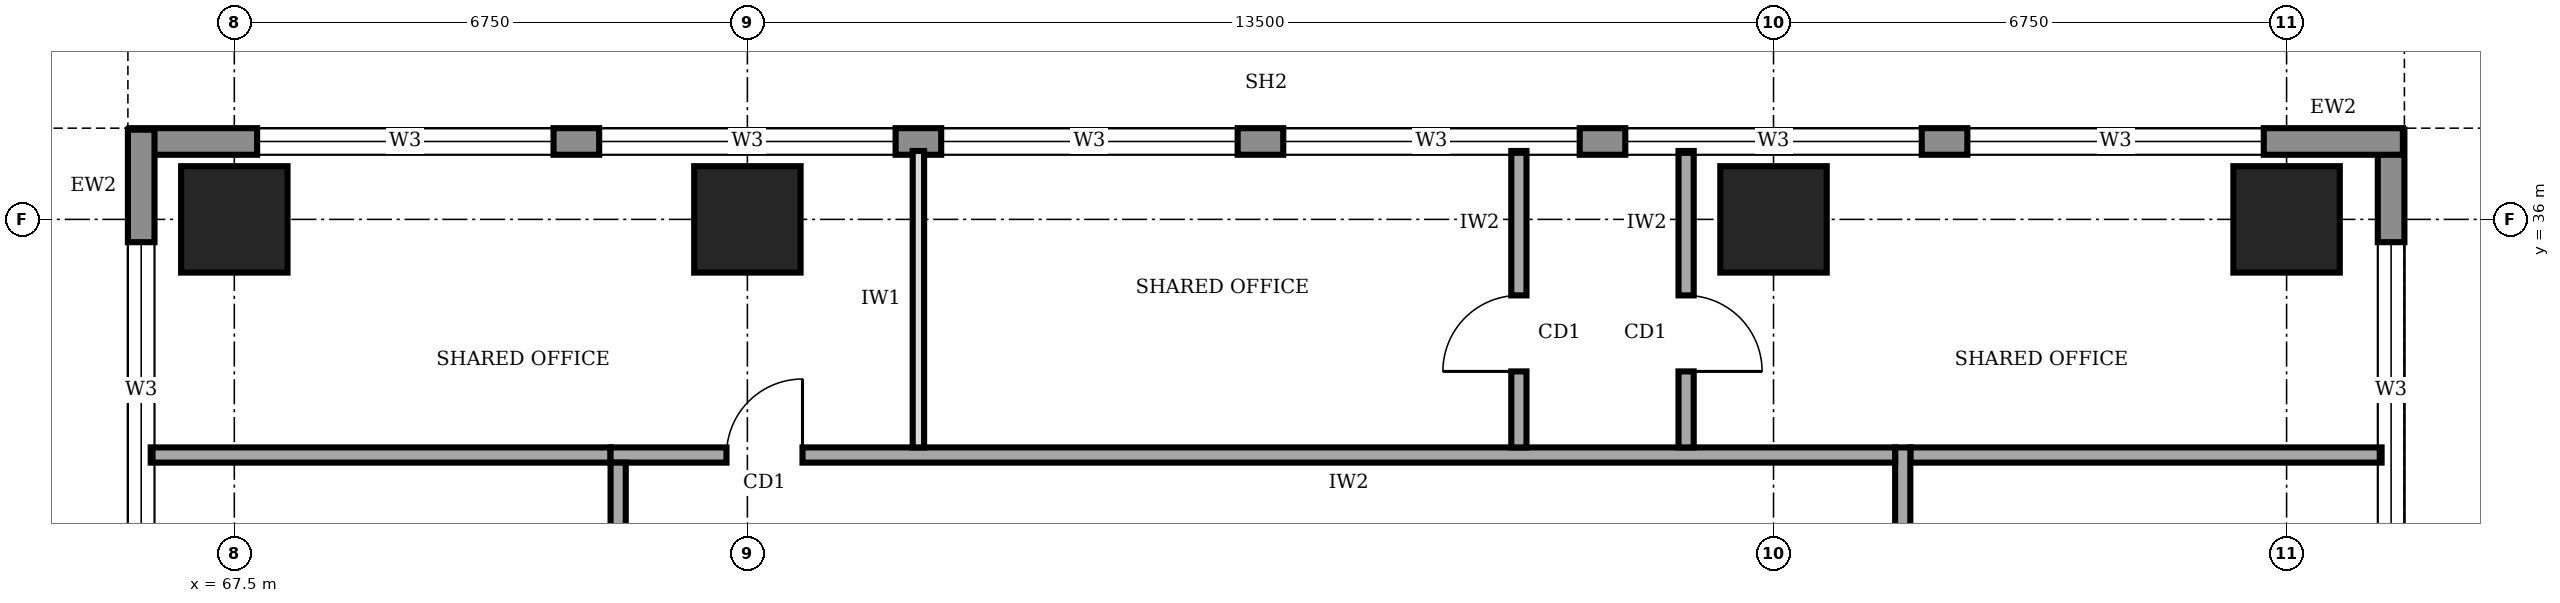
"""IFC4 building model, lengths in metres.
Left out: names, types, materials, properties, quantities, classifications, styles, units other than length and angle.
Written with IfcOpenShell. Run it as: python <this file> out.ifc"""

import sys

from ifc_helpers import new_model, si_unit, direction, frame, frame_2d, origin, origin_2d, place, context, subcontext, project, spatial, rectangle, extrude, element, fill, save


model = new_model("IFC4")
c1 = context("Model", 3, precision=1e-05, world=origin(), true_north=direction((0.0, 1.0)))
c2 = subcontext(c1, "Body", "Model", "MODEL_VIEW")
j1 = project(units=[si_unit("LENGTHUNIT", "METRE"), si_unit("PLANEANGLEUNIT", "RADIAN")], contexts=[c1])
p1 = place(None, origin())
s1 = spatial("IfcSite", under=j1, at=p1, CompositionType="ELEMENT")
p2 = place(p1, origin())
s2 = spatial("IfcBuilding", under=s1, at=p2, CompositionType="ELEMENT")
p3 = place(p2, frame((0.0, 0.0, 193.0)))
s3 = spatial("IfcBuildingStorey", under=s2, at=p3, CompositionType="ELEMENT", Elevation=193.0)
for number, where, z_axis, x_axis in (
    (1, (67.5, 36.0, 0.0), (0.0, 0.0, 1.0), (1.0, 0.0, 0.0)),
    (2, (74.25, 36.0, 0.0), (0.0, 0.0, 1.0), (1.0, 0.0, 0.0)),
    (3, (87.75, 36.0, 0.0), (0.0, 0.0, 1.0), (1.0, 0.0, 0.0)),
    (4, (94.5, 36.0, 0.0), (0.0, 0.0, 1.0), (1.0, 0.0, 0.0)),
):
    element("IfcColumn", number, at=place(p3, frame(where, z_axis=z_axis, x_axis=x_axis)), inside=s3, PredefinedType="COLUMN", context=c2, shape_type="SweptSolid", body=[
        extrude(rectangle(XDim=1.4, YDim=1.4, at=origin_2d()), origin(), (0.0, 0.0, 1.0), 4.0),
    ])
p4 = place(p3, frame((95.875, 3.32, 0.0), z_axis=(0.0, 0.0, 1.0), x_axis=(0.0, 1.0, 0.0)))
e5 = element("IfcWall", 5, at=p4, inside=s3, PredefinedType="STANDARD", context=c2, shape_type="SweptSolid", body=[
    extrude(rectangle(XDim=33.86, YDim=0.35, at=frame_2d((16.93, 0.0))), origin(), (0.0, 0.0, 1.0), 3.75),
])
p5 = place(p4, frame((1.48, 0.0, 0.95)))
e6 = element("IfcOpeningElement", 6, at=p5, cuts=e5, PredefinedType="OPENING", context=c2, shape_type="SweptSolid", body=[
    extrude(rectangle(XDim=3.9, YDim=1.8, at=frame_2d((1.95, 0.9))), frame((0.0, 0.185, 0.0), z_axis=(0.0, -1.0, 0.0), x_axis=(1.0, 0.0, 0.0)), (0.0, 0.0, 1.0), 0.37),
])
p6 = place(p4, frame((5.98, 0.0, 0.95)))
e7 = element("IfcOpeningElement", 7, at=p6, cuts=e5, PredefinedType="OPENING", context=c2, shape_type="SweptSolid", body=[
    extrude(rectangle(XDim=3.9, YDim=1.8, at=frame_2d((1.95, 0.9))), frame((0.0, 0.185, 0.0), z_axis=(0.0, -1.0, 0.0), x_axis=(1.0, 0.0, 0.0)), (0.0, 0.0, 1.0), 0.37),
])
p7 = place(p4, frame((10.48, 0.0, 0.95)))
e8 = element("IfcOpeningElement", 8, at=p7, cuts=e5, PredefinedType="OPENING", context=c2, shape_type="SweptSolid", body=[
    extrude(rectangle(XDim=3.9, YDim=1.8, at=frame_2d((1.95, 0.9))), frame((0.0, 0.185, 0.0), z_axis=(0.0, -1.0, 0.0), x_axis=(1.0, 0.0, 0.0)), (0.0, 0.0, 1.0), 0.37),
])
p8 = place(p4, frame((14.98, 0.0, 0.95)))
e9 = element("IfcOpeningElement", 9, at=p8, cuts=e5, PredefinedType="OPENING", context=c2, shape_type="SweptSolid", body=[
    extrude(rectangle(XDim=3.9, YDim=1.8, at=frame_2d((1.95, 0.9))), frame((0.0, 0.185, 0.0), z_axis=(0.0, -1.0, 0.0), x_axis=(1.0, 0.0, 0.0)), (0.0, 0.0, 1.0), 0.37),
])
p9 = place(p4, frame((19.48, 0.0, 0.95)))
e10 = element("IfcOpeningElement", 10, at=p9, cuts=e5, PredefinedType="OPENING", context=c2, shape_type="SweptSolid", body=[
    extrude(rectangle(XDim=3.9, YDim=1.8, at=frame_2d((1.95, 0.9))), frame((0.0, 0.185, 0.0), z_axis=(0.0, -1.0, 0.0), x_axis=(1.0, 0.0, 0.0)), (0.0, 0.0, 1.0), 0.37),
])
p10 = place(p4, frame((23.98, 0.0, 0.95)))
e11 = element("IfcOpeningElement", 11, at=p10, cuts=e5, PredefinedType="OPENING", context=c2, shape_type="SweptSolid", body=[
    extrude(rectangle(XDim=3.9, YDim=1.8, at=frame_2d((1.95, 0.9))), frame((0.0, 0.185, 0.0), z_axis=(0.0, -1.0, 0.0), x_axis=(1.0, 0.0, 0.0)), (0.0, 0.0, 1.0), 0.37),
])
p11 = place(p4, frame((28.48, 0.0, 0.95)))
e12 = element("IfcOpeningElement", 12, at=p11, cuts=e5, PredefinedType="OPENING", context=c2, shape_type="SweptSolid", body=[
    extrude(rectangle(XDim=3.9, YDim=1.8, at=frame_2d((1.95, 0.9))), frame((0.0, 0.185, 0.0), z_axis=(0.0, -1.0, 0.0), x_axis=(1.0, 0.0, 0.0)), (0.0, 0.0, 1.0), 0.37),
])
p12 = place(p3, frame((96.03, 37.025, 0.0), z_axis=(0.0, 0.0, 1.0), x_axis=(-1.0, 0.0, 0.0)))
e13 = element("IfcWall", 13, at=p12, inside=s3, PredefinedType="STANDARD", context=c2, shape_type="SweptSolid", body=[
    extrude(rectangle(XDim=29.91, YDim=0.35, at=frame_2d((14.955, 0.0))), origin(), (0.0, 0.0, 1.0), 3.75),
])
p13 = place(p12, frame((24.33, 0.0, 0.95)))
e14 = element("IfcOpeningElement", 14, at=p13, cuts=e13, PredefinedType="OPENING", context=c2, shape_type="SweptSolid", body=[
    extrude(rectangle(XDim=3.9, YDim=1.8, at=frame_2d((1.95, 0.9))), frame((0.0, 0.185, 0.0), z_axis=(0.0, -1.0, 0.0), x_axis=(1.0, 0.0, 0.0)), (0.0, 0.0, 1.0), 0.37),
])
p14 = place(p12, frame((19.83, 0.0, 0.95)))
e15 = element("IfcOpeningElement", 15, at=p14, cuts=e13, PredefinedType="OPENING", context=c2, shape_type="SweptSolid", body=[
    extrude(rectangle(XDim=3.9, YDim=1.8, at=frame_2d((1.95, 0.9))), frame((0.0, 0.185, 0.0), z_axis=(0.0, -1.0, 0.0), x_axis=(1.0, 0.0, 0.0)), (0.0, 0.0, 1.0), 0.37),
])
p15 = place(p12, frame((15.33, 0.0, 0.95)))
e16 = element("IfcOpeningElement", 16, at=p15, cuts=e13, PredefinedType="OPENING", context=c2, shape_type="SweptSolid", body=[
    extrude(rectangle(XDim=3.9, YDim=1.8, at=frame_2d((1.95, 0.9))), frame((0.0, 0.185, 0.0), z_axis=(0.0, -1.0, 0.0), x_axis=(1.0, 0.0, 0.0)), (0.0, 0.0, 1.0), 0.37),
])
p16 = place(p12, frame((10.83, 0.0, 0.95)))
e17 = element("IfcOpeningElement", 17, at=p16, cuts=e13, PredefinedType="OPENING", context=c2, shape_type="SweptSolid", body=[
    extrude(rectangle(XDim=3.9, YDim=1.8, at=frame_2d((1.95, 0.9))), frame((0.0, 0.185, 0.0), z_axis=(0.0, -1.0, 0.0), x_axis=(1.0, 0.0, 0.0)), (0.0, 0.0, 1.0), 0.37),
])
p17 = place(p12, frame((6.33, 0.0, 0.95)))
e18 = element("IfcOpeningElement", 18, at=p17, cuts=e13, PredefinedType="OPENING", context=c2, shape_type="SweptSolid", body=[
    extrude(rectangle(XDim=3.9, YDim=1.8, at=frame_2d((1.95, 0.9))), frame((0.0, 0.185, 0.0), z_axis=(0.0, -1.0, 0.0), x_axis=(1.0, 0.0, 0.0)), (0.0, 0.0, 1.0), 0.37),
])
p18 = place(p12, frame((1.83, 0.0, 0.95)))
e19 = element("IfcOpeningElement", 19, at=p18, cuts=e13, PredefinedType="OPENING", context=c2, shape_type="SweptSolid", body=[
    extrude(rectangle(XDim=3.9, YDim=1.8, at=frame_2d((1.95, 0.9))), frame((0.0, 0.185, 0.0), z_axis=(0.0, -1.0, 0.0), x_axis=(1.0, 0.0, 0.0)), (0.0, 0.0, 1.0), 0.37),
])
p19 = place(p3, frame((66.275, 37.18, 0.0), z_axis=(0.0, 0.0, 1.0), x_axis=(0.0, -1.0, 0.0)))
e20 = element("IfcWall", 20, at=p19, inside=s3, PredefinedType="STANDARD", context=c2, shape_type="SweptSolid", body=[
    extrude(rectangle(XDim=33.86, YDim=0.35, at=frame_2d((16.93, 0.0))), origin(), (0.0, 0.0, 1.0), 3.75),
])
p20 = place(p19, frame((28.48, 0.0, 0.95)))
e21 = element("IfcOpeningElement", 21, at=p20, cuts=e20, PredefinedType="OPENING", context=c2, shape_type="SweptSolid", body=[
    extrude(rectangle(XDim=3.9, YDim=1.8, at=frame_2d((1.95, 0.9))), frame((0.0, 0.185, 0.0), z_axis=(0.0, -1.0, 0.0), x_axis=(1.0, 0.0, 0.0)), (0.0, 0.0, 1.0), 0.37),
])
p21 = place(p19, frame((23.98, 0.0, 0.95)))
e22 = element("IfcOpeningElement", 22, at=p21, cuts=e20, PredefinedType="OPENING", context=c2, shape_type="SweptSolid", body=[
    extrude(rectangle(XDim=3.9, YDim=1.8, at=frame_2d((1.95, 0.9))), frame((0.0, 0.185, 0.0), z_axis=(0.0, -1.0, 0.0), x_axis=(1.0, 0.0, 0.0)), (0.0, 0.0, 1.0), 0.37),
])
p22 = place(p19, frame((19.48, 0.0, 0.95)))
e23 = element("IfcOpeningElement", 23, at=p22, cuts=e20, PredefinedType="OPENING", context=c2, shape_type="SweptSolid", body=[
    extrude(rectangle(XDim=3.9, YDim=1.8, at=frame_2d((1.95, 0.9))), frame((0.0, 0.185, 0.0), z_axis=(0.0, -1.0, 0.0), x_axis=(1.0, 0.0, 0.0)), (0.0, 0.0, 1.0), 0.37),
])
p23 = place(p19, frame((14.98, 0.0, 0.95)))
e24 = element("IfcOpeningElement", 24, at=p23, cuts=e20, PredefinedType="OPENING", context=c2, shape_type="SweptSolid", body=[
    extrude(rectangle(XDim=3.9, YDim=1.8, at=frame_2d((1.95, 0.9))), frame((0.0, 0.185, 0.0), z_axis=(0.0, -1.0, 0.0), x_axis=(1.0, 0.0, 0.0)), (0.0, 0.0, 1.0), 0.37),
])
p24 = place(p19, frame((10.48, 0.0, 0.95)))
e25 = element("IfcOpeningElement", 25, at=p24, cuts=e20, PredefinedType="OPENING", context=c2, shape_type="SweptSolid", body=[
    extrude(rectangle(XDim=3.9, YDim=1.8, at=frame_2d((1.95, 0.9))), frame((0.0, 0.185, 0.0), z_axis=(0.0, -1.0, 0.0), x_axis=(1.0, 0.0, 0.0)), (0.0, 0.0, 1.0), 0.37),
])
p25 = place(p19, frame((5.98, 0.0, 0.95)))
e26 = element("IfcOpeningElement", 26, at=p25, cuts=e20, PredefinedType="OPENING", context=c2, shape_type="SweptSolid", body=[
    extrude(rectangle(XDim=3.9, YDim=1.8, at=frame_2d((1.95, 0.9))), frame((0.0, 0.185, 0.0), z_axis=(0.0, -1.0, 0.0), x_axis=(1.0, 0.0, 0.0)), (0.0, 0.0, 1.0), 0.37),
])
p26 = place(p19, frame((1.48, 0.0, 0.95)))
e27 = element("IfcOpeningElement", 27, at=p26, cuts=e20, PredefinedType="OPENING", context=c2, shape_type="SweptSolid", body=[
    extrude(rectangle(XDim=3.9, YDim=1.8, at=frame_2d((1.95, 0.9))), frame((0.0, 0.185, 0.0), z_axis=(0.0, -1.0, 0.0), x_axis=(1.0, 0.0, 0.0)), (0.0, 0.0, 1.0), 0.37),
])
p27 = place(p3, frame((89.45, 7.7, 0.0), z_axis=(0.0, 0.0, 1.0), x_axis=(0.0, 1.0, 0.0)))
e28 = element("IfcWall", 28, at=p27, inside=s3, PredefinedType="SOLIDWALL", context=c2, shape_type="SweptSolid", body=[
    extrude(rectangle(XDim=25.3, YDim=0.2, at=frame_2d((12.65, 0.0))), origin(), (0.0, 0.0, 1.0), 3.75),
])
p28 = place(p27, frame((2.3, 0.0, 0.0)))
e29 = element("IfcOpeningElement", 29, at=p28, cuts=e28, PredefinedType="OPENING", context=c2, shape_type="SweptSolid", body=[
    extrude(rectangle(XDim=1.0, YDim=2.1, at=frame_2d((0.5, 1.05))), frame((0.0, 0.11, 0.0), z_axis=(0.0, -1.0, 0.0), x_axis=(1.0, 0.0, 0.0)), (0.0, 0.0, 1.0), 0.22),
])
p29 = place(p27, frame((7.25, 0.0, 0.0)))
e30 = element("IfcOpeningElement", 30, at=p29, cuts=e28, PredefinedType="OPENING", context=c2, shape_type="SweptSolid", body=[
    extrude(rectangle(XDim=0.9, YDim=2.1, at=frame_2d((0.45, 1.05))), frame((0.0, 0.11, 0.0), z_axis=(0.0, -1.0, 0.0), x_axis=(1.0, 0.0, 0.0)), (0.0, 0.0, 1.0), 0.22),
])
p30 = place(p27, frame((10.25, 0.0, 0.0)))
e31 = element("IfcOpeningElement", 31, at=p30, cuts=e28, PredefinedType="OPENING", context=c2, shape_type="SweptSolid", body=[
    extrude(rectangle(XDim=0.9, YDim=2.1, at=frame_2d((0.45, 1.05))), frame((0.0, 0.11, 0.0), z_axis=(0.0, -1.0, 0.0), x_axis=(1.0, 0.0, 0.0)), (0.0, 0.0, 1.0), 0.22),
])
p31 = place(p27, frame((15.1, 0.0, 0.0)))
e32 = element("IfcOpeningElement", 32, at=p31, cuts=e28, PredefinedType="OPENING", context=c2, shape_type="SweptSolid", body=[
    extrude(rectangle(XDim=0.9, YDim=2.1, at=frame_2d((0.45, 1.05))), frame((0.0, 0.11, 0.0), z_axis=(0.0, -1.0, 0.0), x_axis=(1.0, 0.0, 0.0)), (0.0, 0.0, 1.0), 0.22),
])
p32 = place(p27, frame((17.8, 0.0, 0.0)))
e33 = element("IfcOpeningElement", 33, at=p32, cuts=e28, PredefinedType="OPENING", context=c2, shape_type="SweptSolid", body=[
    extrude(rectangle(XDim=1.0, YDim=2.1, at=frame_2d((0.5, 1.05))), frame((0.0, 0.11, 0.0), z_axis=(0.0, -1.0, 0.0), x_axis=(1.0, 0.0, 0.0)), (0.0, 0.0, 1.0), 0.22),
])
p33 = place(p27, frame((12.3, 0.0, 0.0)))
e34 = element("IfcOpeningElement", 34, at=p33, cuts=e28, PredefinedType="OPENING", context=c2, shape_type="SweptSolid", body=[
    extrude(rectangle(XDim=1.0, YDim=2.1, at=frame_2d((0.5, 1.05))), frame((0.0, 0.11, 0.0), z_axis=(0.0, -1.0, 0.0), x_axis=(1.0, 0.0, 0.0)), (0.0, 0.0, 1.0), 0.22),
])
p34 = place(p27, frame((21.8, 0.0, 0.0)))
e35 = element("IfcOpeningElement", 35, at=p34, cuts=e28, PredefinedType="OPENING", context=c2, shape_type="SweptSolid", body=[
    extrude(rectangle(XDim=1.0, YDim=2.1, at=frame_2d((0.5, 1.05))), frame((0.0, 0.11, 0.0), z_axis=(0.0, -1.0, 0.0), x_axis=(1.0, 0.0, 0.0)), (0.0, 0.0, 1.0), 0.22),
])
p35 = place(p3, frame((89.35, 32.9, 0.0), z_axis=(0.0, 0.0, 1.0), x_axis=(-1.0, 0.0, 0.0)))
e36 = element("IfcWall", 36, at=p35, inside=s3, PredefinedType="SOLIDWALL", context=c2, shape_type="SweptSolid", body=[
    extrude(rectangle(XDim=16.9, YDim=0.2, at=frame_2d((8.45, 0.0))), origin(), (0.0, 0.0, 1.0), 3.75),
])
p36 = place(p35, frame((14.375, 0.0, 0.0)))
e37 = element("IfcOpeningElement", 37, at=p36, cuts=e36, PredefinedType="OPENING", context=c2, shape_type="SweptSolid", body=[
    extrude(rectangle(XDim=1.0, YDim=2.1, at=frame_2d((0.5, 1.05))), frame((0.0, 0.11, 0.0), z_axis=(0.0, -1.0, 0.0), x_axis=(1.0, 0.0, 0.0)), (0.0, 0.0, 1.0), 0.22),
])
p37 = place(p3, frame((72.55, 32.8, 0.0), z_axis=(0.0, 0.0, 1.0), x_axis=(0.0, -1.0, 0.0)))
e38 = element("IfcWall", 38, at=p37, inside=s3, PredefinedType="SOLIDWALL", context=c2, shape_type="SweptSolid", body=[
    extrude(rectangle(XDim=25.3, YDim=0.2, at=frame_2d((12.65, 0.0))), origin(), (0.0, 0.0, 1.0), 3.75),
])
p38 = place(p37, frame((19.55, 0.0, 0.0)))
e39 = element("IfcOpeningElement", 39, at=p38, cuts=e38, PredefinedType="OPENING", context=c2, shape_type="SweptSolid", body=[
    extrude(rectangle(XDim=1.0, YDim=2.1, at=frame_2d((0.5, 1.05))), frame((0.0, 0.11, 0.0), z_axis=(0.0, -1.0, 0.0), x_axis=(1.0, 0.0, 0.0)), (0.0, 0.0, 1.0), 0.22),
])
p39 = place(p37, frame((6.8, 0.0, 0.0)))
e40 = element("IfcOpeningElement", 40, at=p39, cuts=e38, PredefinedType="OPENING", context=c2, shape_type="SweptSolid", body=[
    extrude(rectangle(XDim=1.0, YDim=2.1, at=frame_2d((0.5, 1.05))), frame((0.0, 0.11, 0.0), z_axis=(0.0, -1.0, 0.0), x_axis=(1.0, 0.0, 0.0)), (0.0, 0.0, 1.0), 0.22),
])
p40 = place(p3, frame((84.4, 33.0, 0.0), z_axis=(0.0, 0.0, 1.0), x_axis=(0.0, 1.0, 0.0)))
e41 = element("IfcWall", 41, at=p40, inside=s3, PredefinedType="SOLIDWALL", context=c2, shape_type="SweptSolid", body=[
    extrude(rectangle(XDim=3.9, YDim=0.2, at=frame_2d((1.95, 0.0))), origin(), (0.0, 0.0, 1.0), 3.75),
])
p41 = place(p40, frame((1.0, 0.0, 0.0)))
e42 = element("IfcOpeningElement", 42, at=p41, cuts=e41, PredefinedType="OPENING", context=c2, shape_type="SweptSolid", body=[
    extrude(rectangle(XDim=1.0, YDim=2.1, at=frame_2d((0.5, 1.05))), frame((0.0, 0.11, 0.0), z_axis=(0.0, -1.0, 0.0), x_axis=(1.0, 0.0, 0.0)), (0.0, 0.0, 1.0), 0.22),
])
p42 = place(p3, frame((86.6, 36.9, 0.0), z_axis=(0.0, 0.0, 1.0), x_axis=(0.0, -1.0, 0.0)))
e43 = element("IfcWall", 43, at=p42, inside=s3, PredefinedType="SOLIDWALL", context=c2, shape_type="SweptSolid", body=[
    extrude(rectangle(XDim=3.9, YDim=0.2, at=frame_2d((1.95, 0.0))), origin(), (0.0, 0.0, 1.0), 3.75),
])
p43 = place(p42, frame((1.9, 0.0, 0.0)))
e44 = element("IfcOpeningElement", 44, at=p43, cuts=e43, PredefinedType="OPENING", context=c2, shape_type="SweptSolid", body=[
    extrude(rectangle(XDim=1.0, YDim=2.1, at=frame_2d((0.5, 1.05))), frame((0.0, 0.11, 0.0), z_axis=(0.0, -1.0, 0.0), x_axis=(1.0, 0.0, 0.0)), (0.0, 0.0, 1.0), 0.22),
])
p44 = place(p3, frame((66.4, 32.9, 0.0), z_axis=(0.0, 0.0, 1.0), x_axis=(1.0, 0.0, 0.0)))
e45 = element("IfcWall", 45, at=p44, inside=s3, PredefinedType="SOLIDWALL", context=c2, shape_type="SweptSolid", body=[
    extrude(rectangle(XDim=6.05, YDim=0.2, at=frame_2d((3.025, 0.0))), origin(), (0.0, 0.0, 1.0), 3.75),
])
p45 = place(p3, frame((89.55, 32.9, 0.0), z_axis=(0.0, 0.0, 1.0), x_axis=(1.0, 0.0, 0.0)))
e46 = element("IfcWall", 46, at=p45, inside=s3, PredefinedType="SOLIDWALL", context=c2, shape_type="SweptSolid", body=[
    extrude(rectangle(XDim=6.2, YDim=0.2, at=frame_2d((3.1, 0.0))), origin(), (0.0, 0.0, 1.0), 3.75),
])
p46 = place(p3, frame((76.5, 33.0, 0.0), z_axis=(0.0, 0.0, 1.0), x_axis=(0.0, 1.0, 0.0)))
e47 = element("IfcWall", 47, at=p46, inside=s3, PredefinedType="PARTITIONING", context=c2, shape_type="SweptSolid", body=[
    extrude(rectangle(XDim=3.9, YDim=0.15, at=frame_2d((1.95, 0.0))), origin(), (0.0, 0.0, 1.0), 3.75),
])
p47 = place(p11, origin())
e48 = element("IfcWindow", 48, at=p47, inside=s3, PartitioningType="SINGLE_PANEL", PredefinedType="WINDOW", context=c2, shape_type="SweptSolid", body=[
    extrude(rectangle(XDim=3.9, YDim=1.8, at=frame_2d((1.95, 0.9))), frame((0.0, 0.03, 0.0), z_axis=(0.0, -1.0, 0.0), x_axis=(1.0, 0.0, 0.0)), (0.0, 0.0, 1.0), 0.06),
])
fill(e12, e48)
p48 = place(p13, origin())
e49 = element("IfcWindow", 49, at=p48, inside=s3, PartitioningType="SINGLE_PANEL", PredefinedType="WINDOW", context=c2, shape_type="SweptSolid", body=[
    extrude(rectangle(XDim=3.9, YDim=1.8, at=frame_2d((1.95, 0.9))), frame((0.0, 0.03, 0.0), z_axis=(0.0, -1.0, 0.0), x_axis=(1.0, 0.0, 0.0)), (0.0, 0.0, 1.0), 0.06),
])
fill(e14, e49)
p49 = place(p14, origin())
e50 = element("IfcWindow", 50, at=p49, inside=s3, PartitioningType="SINGLE_PANEL", PredefinedType="WINDOW", context=c2, shape_type="SweptSolid", body=[
    extrude(rectangle(XDim=3.9, YDim=1.8, at=frame_2d((1.95, 0.9))), frame((0.0, 0.03, 0.0), z_axis=(0.0, -1.0, 0.0), x_axis=(1.0, 0.0, 0.0)), (0.0, 0.0, 1.0), 0.06),
])
fill(e15, e50)
p50 = place(p15, origin())
e51 = element("IfcWindow", 51, at=p50, inside=s3, PartitioningType="SINGLE_PANEL", PredefinedType="WINDOW", context=c2, shape_type="SweptSolid", body=[
    extrude(rectangle(XDim=3.9, YDim=1.8, at=frame_2d((1.95, 0.9))), frame((0.0, 0.03, 0.0), z_axis=(0.0, -1.0, 0.0), x_axis=(1.0, 0.0, 0.0)), (0.0, 0.0, 1.0), 0.06),
])
fill(e16, e51)
p51 = place(p16, origin())
e52 = element("IfcWindow", 52, at=p51, inside=s3, PartitioningType="SINGLE_PANEL", PredefinedType="WINDOW", context=c2, shape_type="SweptSolid", body=[
    extrude(rectangle(XDim=3.9, YDim=1.8, at=frame_2d((1.95, 0.9))), frame((0.0, 0.03, 0.0), z_axis=(0.0, -1.0, 0.0), x_axis=(1.0, 0.0, 0.0)), (0.0, 0.0, 1.0), 0.06),
])
fill(e17, e52)
p52 = place(p17, origin())
e53 = element("IfcWindow", 53, at=p52, inside=s3, PartitioningType="SINGLE_PANEL", PredefinedType="WINDOW", context=c2, shape_type="SweptSolid", body=[
    extrude(rectangle(XDim=3.9, YDim=1.8, at=frame_2d((1.95, 0.9))), frame((0.0, 0.03, 0.0), z_axis=(0.0, -1.0, 0.0), x_axis=(1.0, 0.0, 0.0)), (0.0, 0.0, 1.0), 0.06),
])
fill(e18, e53)
p53 = place(p18, origin())
e54 = element("IfcWindow", 54, at=p53, inside=s3, PartitioningType="SINGLE_PANEL", PredefinedType="WINDOW", context=c2, shape_type="SweptSolid", body=[
    extrude(rectangle(XDim=3.9, YDim=1.8, at=frame_2d((1.95, 0.9))), frame((0.0, 0.03, 0.0), z_axis=(0.0, -1.0, 0.0), x_axis=(1.0, 0.0, 0.0)), (0.0, 0.0, 1.0), 0.06),
])
fill(e19, e54)
p54 = place(p26, origin())
e55 = element("IfcWindow", 55, at=p54, inside=s3, PartitioningType="SINGLE_PANEL", PredefinedType="WINDOW", context=c2, shape_type="SweptSolid", body=[
    extrude(rectangle(XDim=3.9, YDim=1.8, at=frame_2d((1.95, 0.9))), frame((0.0, 0.03, 0.0), z_axis=(0.0, -1.0, 0.0), x_axis=(1.0, 0.0, 0.0)), (0.0, 0.0, 1.0), 0.06),
])
fill(e27, e55)
p55 = place(p36, frame((1.0, 0.0, 0.0), z_axis=(0.0, 0.0, 1.0), x_axis=(-1.0, 0.0, 0.0)))
e56 = element("IfcDoor", 56, at=p55, inside=s3, OperationType="SINGLE_SWING_RIGHT", PredefinedType="DOOR", context=c2, shape_type="SweptSolid", body=[
    extrude(rectangle(XDim=1.0, YDim=2.1, at=frame_2d((0.5, 1.05))), frame((0.0, 0.025, 0.0), z_axis=(0.0, -1.0, 0.0), x_axis=(1.0, 0.0, 0.0)), (0.0, 0.0, 1.0), 0.05),
])
fill(e37, e56)
p56 = place(p41, origin())
e57 = element("IfcDoor", 57, at=p56, inside=s3, OperationType="SINGLE_SWING_LEFT", PredefinedType="DOOR", context=c2, shape_type="SweptSolid", body=[
    extrude(rectangle(XDim=1.0, YDim=2.1, at=frame_2d((0.5, 1.05))), frame((0.0, 0.025, 0.0), z_axis=(0.0, -1.0, 0.0), x_axis=(1.0, 0.0, 0.0)), (0.0, 0.0, 1.0), 0.05),
])
fill(e42, e57)
p57 = place(p43, origin())
e58 = element("IfcDoor", 58, at=p57, inside=s3, OperationType="SINGLE_SWING_RIGHT", PredefinedType="DOOR", context=c2, shape_type="SweptSolid", body=[
    extrude(rectangle(XDim=1.0, YDim=2.1, at=frame_2d((0.5, 1.05))), frame((0.0, 0.025, 0.0), z_axis=(0.0, -1.0, 0.0), x_axis=(1.0, 0.0, 0.0)), (0.0, 0.0, 1.0), 0.05),
])
fill(e44, e58)
save(model, sys.argv[1])
